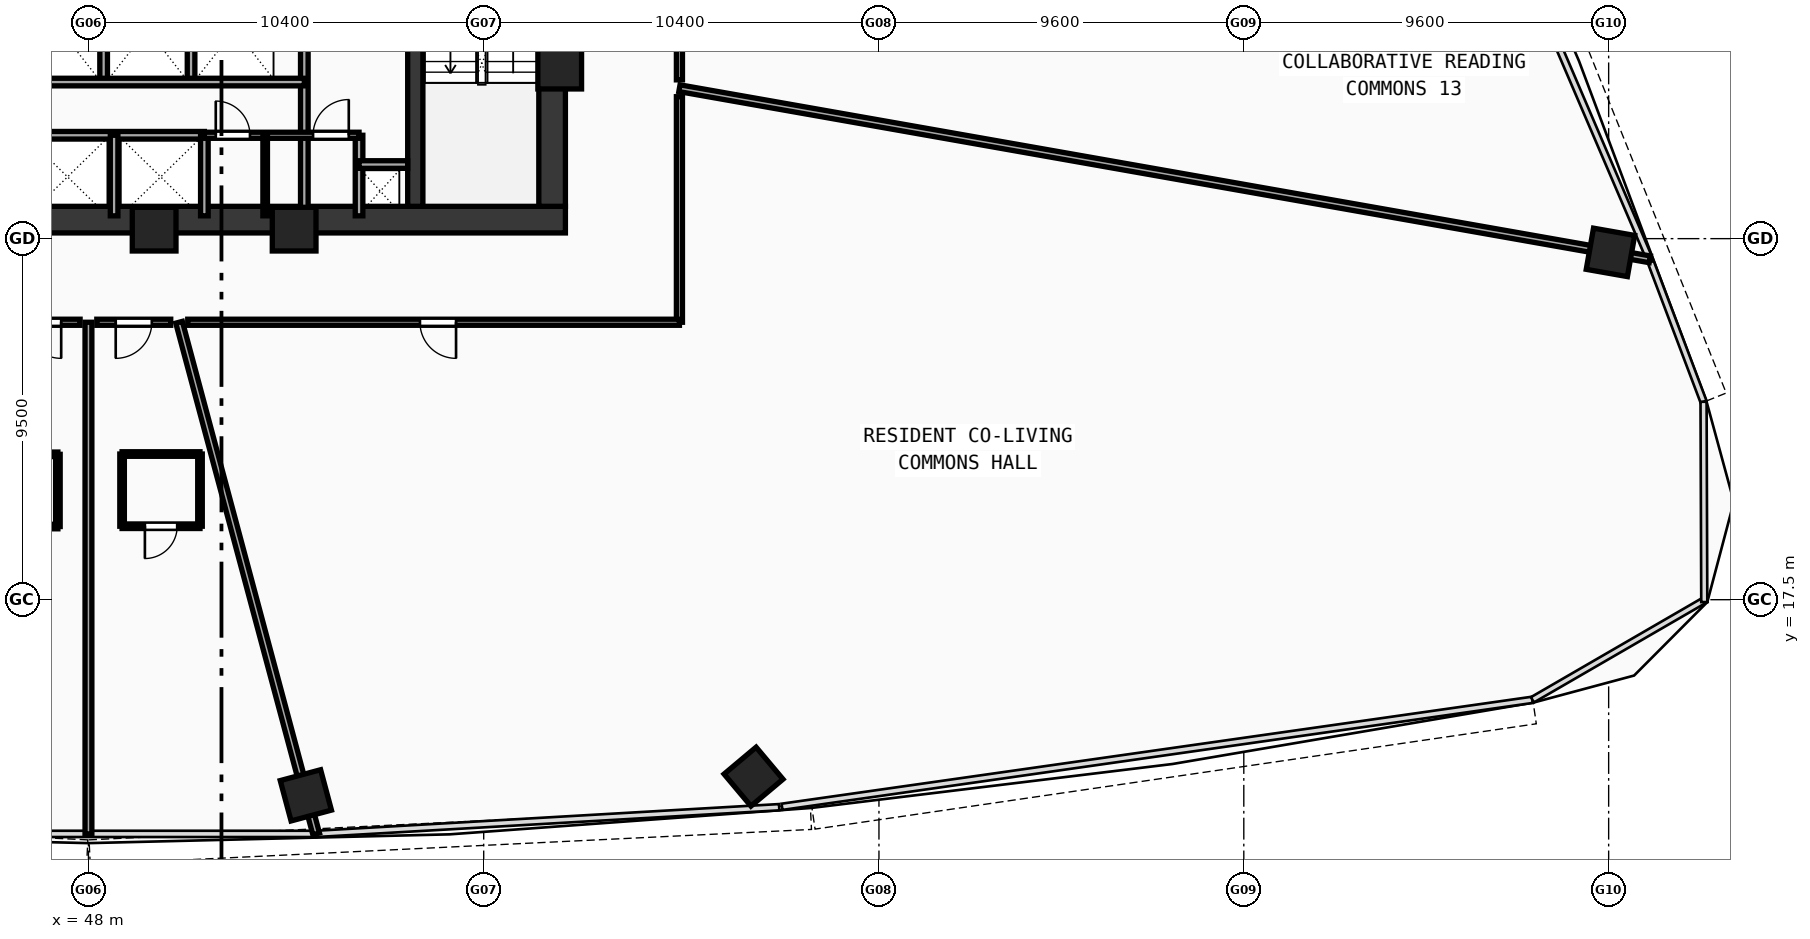
"""IFC4 building model, lengths in metres.
Left out: names, types, materials, properties, quantities, classifications, styles, units other than length and angle.
Written with IfcOpenShell. Run it as: python <this file> out.ifc"""

import sys

from ifc_helpers import new_model, si_unit, direction, frame, frame_2d, origin, origin_with_axes, origin_2d, place, context, subcontext, project, spatial, rectangle, hollow_rectangle, extrude, source, transform, mapped, element, fill, save


model = new_model("IFC4")
c1 = context("Model", 3, precision=1e-05, world=origin(), true_north=direction((0.0, 1.0)))
c2 = subcontext(c1, "Body", "Model", "MODEL_VIEW")
j1 = project(units=[si_unit("LENGTHUNIT", "METRE"), si_unit("PLANEANGLEUNIT", "RADIAN")], contexts=[c1])
p1 = place(None, origin())
s1 = spatial("IfcSite", under=j1, at=p1, CompositionType="ELEMENT")
p2 = place(p1, origin())
s2 = spatial("IfcBuilding", under=s1, at=p2, CompositionType="ELEMENT")
p3 = place(p2, frame((0.0, 0.0, 66.7)))
s3 = spatial("IfcBuildingStorey", under=s2, at=p3, CompositionType="ELEMENT", Elevation=66.7)
p4 = place(p3, frame((35.45, 27.5, 0.0), z_axis=(0.0, 0.0, 1.0), x_axis=(1.0, 0.0, 0.0)))
e1 = element("IfcWall", 1, at=p4, inside=s3, PredefinedType="SHEAR", context=c2, shape_type="SweptSolid", body=[
    extrude(rectangle(XDim=25.1, YDim=0.7, at=frame_2d((12.55, 0.0))), origin(), (0.0, 0.0, 1.0), 3.37),
])
p5 = place(p3, frame((60.2, 27.85, 0.0), z_axis=(0.0, 0.0, 1.0), x_axis=(0.0, 1.0, 0.0)))
e2 = element("IfcWall", 2, at=p5, inside=s3, PredefinedType="SHEAR", context=c2, shape_type="SweptSolid", body=[
    extrude(rectangle(XDim=12.0, YDim=0.7, at=frame_2d((6.0, 0.0))), origin(), (0.0, 0.0, 1.0), 3.37),
])
p6 = place(p3, frame((56.6, 27.85, 0.0), z_axis=(0.0, 0.0, 1.0), x_axis=(0.0, 1.0, 0.0)))
e3 = element("IfcWall", 3, at=p6, inside=s3, PredefinedType="SHEAR", context=c2, shape_type="SweptSolid", body=[
    extrude(rectangle(XDim=12.0, YDim=0.4, at=frame_2d((6.0, 0.0))), origin(), (0.0, 0.0, 1.0), 3.37),
])
p7 = place(p6, frame((9.9, 0.0, 0.0)))
e4 = element("IfcOpeningElement", 4, at=p7, cuts=e3, PredefinedType="OPENING", context=c2, shape_type="SweptSolid", body=[
    extrude(rectangle(XDim=1.1, YDim=2.1, at=frame_2d((0.55, 1.05))), frame((0.0, 0.21, 0.0), z_axis=(0.0, -1.0, 0.0), x_axis=(1.0, 0.0, 0.0)), (0.0, 0.0, 1.0), 0.42),
])
m1 = source(origin(), c2, "Body", "SweptSolid", [
    extrude(hollow_rectangle(XDim=1.15, YDim=1.15, WallThickness=0.048, at=origin_2d()), origin(), (0.0, 0.0, 1.0), 3.63),
])
for number, where, z_axis, x_axis in (
    (5, (49.729, 27.25, -0.26), (0.0, 0.0, 1.0), (1.0, 0.0, 0.0)),
    (6, (53.412, 27.25, -0.26), (0.0, 0.0, 1.0), (1.0, 0.0, 0.0)),
    (7, (60.4, 31.513, -0.26), (0.0, 0.0, 1.0), (1.0, 0.0, 0.0)),
):
    element("IfcColumn", number, at=place(p3, frame(where, z_axis=z_axis, x_axis=x_axis)), inside=s3, PredefinedType="COLUMN", context=c2, shape_type="MappedRepresentation", body=[
        mapped(m1, transform((0.0, 0.0, 0.0), scale=1.0)),
    ])
m2 = source(origin(), c2, "Body", "SweptSolid", [
    extrude(hollow_rectangle(XDim=1.1, YDim=1.1, WallThickness=0.045, at=origin_2d()), origin(), (0.0, 0.0, 1.0), 3.63),
])
for number, where, z_axis, x_axis in (
    (8, (53.72, 12.352, -0.26), (0.0, 0.0, 1.0), (0.966, 0.259, 0.0)),
    (9, (65.5, 12.844, -0.26), (0.0, 0.0, 1.0), (0.766, 0.643, 0.0)),
    (10, (88.048, 26.638, -0.26), (0.0, 0.0, 1.0), (0.174, 0.985, 0.0)),
):
    element("IfcColumn", number, at=place(p3, frame(where, z_axis=z_axis, x_axis=x_axis)), inside=s3, PredefinedType="COLUMN", context=c2, shape_type="MappedRepresentation", body=[
        mapped(m2, transform((0.0, 0.0, 0.0), scale=1.0)),
    ])
p8 = place(p3, frame((53.68, 27.6, 0.0), z_axis=(0.0, 0.0, 1.0), x_axis=(0.0, 1.0, 0.0)))
e11 = element("IfcWall", 11, at=p8, inside=s3, PredefinedType="SOLIDWALL", context=c2, shape_type="SweptSolid", body=[
    extrude(rectangle(XDim=9.05, YDim=0.2, at=frame_2d((4.525, 0.0))), origin(), (0.0, 0.0, 1.0), 3.37),
])
p9 = place(p8, frame((6.9, 0.0, 0.0)))
e12 = element("IfcOpeningElement", 12, at=p9, cuts=e11, PredefinedType="OPENING", context=c2, shape_type="SweptSolid", body=[
    extrude(rectangle(XDim=1.05, YDim=2.1, at=frame_2d((0.525, 1.05))), frame((0.0, 0.11, 0.0), z_axis=(0.0, -1.0, 0.0), x_axis=(1.0, 0.0, 0.0)), (0.0, 0.0, 1.0), 0.22),
])
for number, where, z_axis, x_axis in (
    (13, (48.4, 31.12, 0.0), (0.0, 0.0, 1.0), (0.0, 1.0, 0.0)),
    (14, (50.7, 31.12, 0.0), (0.0, 0.0, 1.0), (0.0, 1.0, 0.0)),
):
    element("IfcWall", number, at=place(p3, frame(where, z_axis=z_axis, x_axis=x_axis)), inside=s3, PredefinedType="SOLIDWALL", context=c2, shape_type="SweptSolid", body=[
        extrude(rectangle(XDim=2.7, YDim=0.2, at=frame_2d((1.35, 0.0))), origin(), (0.0, 0.0, 1.0), 3.37),
    ])
p10 = place(p3, frame((43.85, 29.72, 0.0), z_axis=(0.0, 0.0, 1.0), x_axis=(1.0, 0.0, 0.0)))
e15 = element("IfcWall", 15, at=p10, inside=s3, PredefinedType="SOLIDWALL", context=c2, shape_type="SweptSolid", body=[
    extrude(rectangle(XDim=7.2, YDim=0.2, at=frame_2d((3.6, 0.0))), origin(), (0.0, 0.0, 1.0), 3.37),
])
p11 = place(p3, frame((51.05, 27.6, 0.0), z_axis=(0.0, 0.0, 1.0), x_axis=(0.0, 1.0, 0.0)))
e16 = element("IfcWall", 16, at=p11, inside=s3, PredefinedType="SOLIDWALL", context=c2, shape_type="SweptSolid", body=[
    extrude(rectangle(XDim=2.12, YDim=0.2, at=frame_2d((1.06, 0.0))), origin(), (0.0, 0.0, 1.0), 3.37),
])
p12 = place(p3, frame((43.85, 31.12, 0.0), z_axis=(0.0, 0.0, 1.0), x_axis=(1.0, 0.0, 0.0)))
e17 = element("IfcWall", 17, at=p12, inside=s3, PredefinedType="SOLIDWALL", context=c2, shape_type="SweptSolid", body=[
    extrude(rectangle(XDim=9.83, YDim=0.2, at=frame_2d((4.915, 0.0))), origin(), (0.0, 0.0, 1.0), 3.37),
])
for number, where, z_axis, x_axis in (
    (18, (48.675, 27.6, 0.0), (0.0, 0.0, 1.0), (0.0, 1.0, 0.0)),
    (19, (55.12, 27.6, 0.0), (0.0, 0.0, 1.0), (0.0, 1.0, 0.0)),
):
    element("IfcWall", number, at=place(p3, frame(where, z_axis=z_axis, x_axis=x_axis)), inside=s3, PredefinedType="SOLIDWALL", context=c2, shape_type="SweptSolid", body=[
        extrude(rectangle(XDim=2.12, YDim=0.2, at=frame_2d((1.06, 0.0))), origin(), (0.0, 0.0, 1.0), 3.37),
    ])
p13 = place(p3, frame((55.12, 28.95, 0.0), z_axis=(0.0, 0.0, 1.0), x_axis=(1.0, 0.0, 0.0)))
e20 = element("IfcWall", 20, at=p13, inside=s3, PredefinedType="SOLIDWALL", context=c2, shape_type="SweptSolid", body=[
    extrude(rectangle(XDim=1.28, YDim=0.2, at=frame_2d((0.64, 0.0))), origin(), (0.0, 0.0, 1.0), 3.37),
])
p14 = place(p3, frame((51.05, 29.72, 0.0), z_axis=(0.0, 0.0, 1.0), x_axis=(1.0, 0.0, 0.0)))
e21 = element("IfcWall", 21, at=p14, inside=s3, PredefinedType="PARTITIONING", context=c2, shape_type="SweptSolid", body=[
    extrude(rectangle(XDim=4.07, YDim=0.16, at=frame_2d((2.035, 0.0))), origin(), (0.0, 0.0, 1.0), 3.37),
])
p15 = place(p14, frame((0.3, 0.0, 0.0)))
e22 = element("IfcOpeningElement", 22, at=p15, cuts=e21, PredefinedType="OPENING", context=c2, shape_type="SweptSolid", body=[
    extrude(rectangle(XDim=0.9, YDim=2.1, at=frame_2d((0.45, 1.05))), frame((0.0, 0.09, 0.0), z_axis=(0.0, -1.0, 0.0), x_axis=(1.0, 0.0, 0.0)), (0.0, 0.0, 1.0), 0.18),
])
p16 = place(p14, frame((2.86, 0.0, 0.0)))
e23 = element("IfcOpeningElement", 23, at=p16, cuts=e21, PredefinedType="OPENING", context=c2, shape_type="SweptSolid", body=[
    extrude(rectangle(XDim=0.94, YDim=2.1, at=frame_2d((0.47, 1.05))), frame((0.0, 0.09, 0.0), z_axis=(0.0, -1.0, 0.0), x_axis=(1.0, 0.0, 0.0)), (0.0, 0.0, 1.0), 0.18),
])
p17 = place(p3, frame((52.65, 27.6, 0.0), z_axis=(0.0, 0.0, 1.0), x_axis=(0.0, 1.0, 0.0)))
e24 = element("IfcWall", 24, at=p17, inside=s3, PredefinedType="PARTITIONING", context=c2, shape_type="SweptSolid", body=[
    extrude(rectangle(XDim=2.12, YDim=0.12, at=frame_2d((1.06, 0.0))), origin(), (0.0, 0.0, 1.0), 3.37),
])
p18 = place(p3, frame((48.0, 24.8, 0.0), z_axis=(0.0, 0.0, 1.0), x_axis=(0.0, -1.0, 0.0)))
e25 = element("IfcWall", 25, at=p18, inside=s3, PredefinedType="PARTITIONING", context=c2, shape_type="SweptSolid", body=[
    extrude(rectangle(XDim=13.462, YDim=0.18, at=frame_2d((6.731, 0.0))), origin(), (0.0, 0.0, 1.0), 2.67),
])
p19 = place(p3, frame((50.385, 24.8, 0.0), z_axis=(0.0, 0.0, 1.0), x_axis=(0.258819267056, -0.965925766817, 0.0)))
e26 = element("IfcWall", 26, at=p19, inside=s3, PredefinedType="PARTITIONING", context=c2, shape_type="SweptSolid", body=[
    extrude(rectangle(XDim=13.937, YDim=0.18, at=frame_2d((6.969, 0.0))), origin(), (0.0, 0.0, 1.0), 2.67),
])
p20 = place(p3, frame((63.55, 30.958, 0.0), z_axis=(0.0, 0.0, 1.0), x_axis=(0.984809239356, -0.173639747982, 0.0)))
e27 = element("IfcWall", 27, at=p20, inside=s3, PredefinedType="PARTITIONING", context=c2, shape_type="SweptSolid", body=[
    extrude(rectangle(XDim=25.926, YDim=0.18, at=frame_2d((12.963, 0.0))), origin(), (0.0, 0.0, 1.0), 2.67),
])
p21 = place(p3, frame((63.55, 34.023, 0.0), z_axis=(0.0, 0.0, 1.0), x_axis=(0.0, -1.0, 0.0)))
e28 = element("IfcWall", 28, at=p21, inside=s3, PredefinedType="PARTITIONING", context=c2, shape_type="SweptSolid", body=[
    extrude(rectangle(XDim=2.845, YDim=0.16, at=frame_2d((1.423, 0.0))), origin(), (0.0, 0.0, 1.0), 3.37),
])
p22 = place(p21, frame((0.948, 0.0, 0.0)))
e29 = element("IfcOpeningElement", 29, at=p22, cuts=e28, PredefinedType="OPENING", context=c2, shape_type="SweptSolid", body=[
    extrude(rectangle(XDim=0.95, YDim=2.1, at=frame_2d((0.475, 1.05))), frame((0.0, 0.09, 0.0), z_axis=(0.0, -1.0, 0.0), x_axis=(1.0, 0.0, 0.0)), (0.0, 0.0, 1.0), 0.18),
])
p23 = place(p3, frame((63.55, 30.735, 0.0), z_axis=(0.0, 0.0, 1.0), x_axis=(0.0, -1.0, 0.0)))
e30 = element("IfcWall", 30, at=p23, inside=s3, PredefinedType="PARTITIONING", context=c2, shape_type="SweptSolid", body=[
    extrude(rectangle(XDim=5.935, YDim=0.16, at=frame_2d((2.967, 0.0))), origin(), (0.0, 0.0, 1.0), 2.97),
])
p24 = place(p3, frame((63.55, 24.8, 0.0), z_axis=(0.0, 0.0, 1.0), x_axis=(-1.0, 0.0, 0.0)))
e31 = element("IfcWall", 31, at=p24, inside=s3, PredefinedType="PARTITIONING", context=c2, shape_type="SweptSolid", body=[
    extrude(rectangle(XDim=12.938, YDim=0.16, at=frame_2d((6.469, 0.0))), origin(), (0.0, 0.0, 1.0), 2.67),
])
p25 = place(p24, frame((5.878, 0.0, 0.0)))
e32 = element("IfcOpeningElement", 32, at=p25, cuts=e31, PredefinedType="OPENING", context=c2, shape_type="SweptSolid", body=[
    extrude(rectangle(XDim=0.95, YDim=2.1, at=frame_2d((0.475, 1.05))), frame((0.0, 0.09, 0.0), z_axis=(0.0, -1.0, 0.0), x_axis=(1.0, 0.0, 0.0)), (0.0, 0.0, 1.0), 0.18),
])
p26 = place(p3, frame((50.165, 24.8, 0.0), z_axis=(0.0, 0.0, 1.0), x_axis=(-1.0, 0.0, 0.0)))
e33 = element("IfcWall", 33, at=p26, inside=s3, PredefinedType="PARTITIONING", context=c2, shape_type="SweptSolid", body=[
    extrude(rectangle(XDim=1.945, YDim=0.16, at=frame_2d((0.972, 0.0))), origin(), (0.0, 0.0, 1.0), 3.37),
])
p27 = place(p26, frame((0.498, 0.0, 0.0)))
e34 = element("IfcOpeningElement", 34, at=p27, cuts=e33, PredefinedType="OPENING", context=c2, shape_type="SweptSolid", body=[
    extrude(rectangle(XDim=0.95, YDim=2.1, at=frame_2d((0.475, 1.05))), frame((0.0, 0.09, 0.0), z_axis=(0.0, -1.0, 0.0), x_axis=(1.0, 0.0, 0.0)), (0.0, 0.0, 1.0), 0.18),
])
p28 = place(p3, frame((47.78, 24.8, 0.0), z_axis=(0.0, 0.0, 1.0), x_axis=(-1.0, 0.0, 0.0)))
e35 = element("IfcWall", 35, at=p28, inside=s3, PredefinedType="PARTITIONING", context=c2, shape_type="SweptSolid", body=[
    extrude(rectangle(XDim=1.945, YDim=0.16, at=frame_2d((0.972, 0.0))), origin(), (0.0, 0.0, 1.0), 3.37),
])
p29 = place(p28, frame((0.497, 0.0, 0.0)))
e36 = element("IfcOpeningElement", 36, at=p29, cuts=e35, PredefinedType="OPENING", context=c2, shape_type="SweptSolid", body=[
    extrude(rectangle(XDim=0.95, YDim=2.1, at=frame_2d((0.475, 1.05))), frame((0.0, 0.09, 0.0), z_axis=(0.0, -1.0, 0.0), x_axis=(1.0, 0.0, 0.0)), (0.0, 0.0, 1.0), 0.18),
])
p30 = place(p3, frame((45.146, 19.425, 0.0), z_axis=(0.0, 0.0, 1.0), x_axis=(1.0, 0.0, 0.0)))
e37 = element("IfcWall", 37, at=p30, inside=s3, PredefinedType="PARTITIONING", context=c2, shape_type="SweptSolid", body=[
    extrude(rectangle(XDim=2.05, YDim=0.12, at=frame_2d((1.025, 0.0))), origin(), (0.0, 0.0, 1.0), 3.37),
])
p31 = place(p30, frame((0.6, 0.0, 0.0)))
e38 = element("IfcOpeningElement", 38, at=p31, cuts=e37, PredefinedType="OPENING", context=c2, shape_type="SweptSolid", body=[
    extrude(rectangle(XDim=0.85, YDim=2.1, at=frame_2d((0.425, 1.05))), frame((0.0, 0.07, 0.0), z_axis=(0.0, -1.0, 0.0), x_axis=(1.0, 0.0, 0.0)), (0.0, 0.0, 1.0), 0.14),
])
p32 = place(p3, frame((47.196, 19.425, 0.0), z_axis=(0.0, 0.0, 1.0), x_axis=(0.0, 1.0, 0.0)))
e39 = element("IfcWall", 39, at=p32, inside=s3, PredefinedType="PARTITIONING", context=c2, shape_type="SweptSolid", body=[
    extrude(rectangle(XDim=1.9, YDim=0.12, at=frame_2d((0.95, 0.0))), origin(), (0.0, 0.0, 1.0), 3.37),
])
p33 = place(p3, frame((47.196, 21.325, 0.0), z_axis=(0.0, 0.0, 1.0), x_axis=(-1.0, 0.0, 0.0)))
e40 = element("IfcWall", 40, at=p33, inside=s3, PredefinedType="PARTITIONING", context=c2, shape_type="SweptSolid", body=[
    extrude(rectangle(XDim=2.05, YDim=0.12, at=frame_2d((1.025, 0.0))), origin(), (0.0, 0.0, 1.0), 3.37),
])
p34 = place(p3, frame((48.885, 19.433, 0.0), z_axis=(0.0, 0.0, 1.0), x_axis=(1.0, 0.0, 0.0)))
e41 = element("IfcWall", 41, at=p34, inside=s3, PredefinedType="PARTITIONING", context=c2, shape_type="SweptSolid", body=[
    extrude(rectangle(XDim=2.05, YDim=0.12, at=frame_2d((1.025, 0.0))), origin(), (0.0, 0.0, 1.0), 3.37),
])
p35 = place(p34, frame((0.6, 0.0, 0.0)))
e42 = element("IfcOpeningElement", 42, at=p35, cuts=e41, PredefinedType="OPENING", context=c2, shape_type="SweptSolid", body=[
    extrude(rectangle(XDim=0.85, YDim=2.1, at=frame_2d((0.425, 1.05))), frame((0.0, 0.07, 0.0), z_axis=(0.0, -1.0, 0.0), x_axis=(1.0, 0.0, 0.0)), (0.0, 0.0, 1.0), 0.14),
])
p36 = place(p3, frame((50.935, 19.433, 0.0), z_axis=(0.0, 0.0, 1.0), x_axis=(0.0, 1.0, 0.0)))
e43 = element("IfcWall", 43, at=p36, inside=s3, PredefinedType="PARTITIONING", context=c2, shape_type="SweptSolid", body=[
    extrude(rectangle(XDim=1.9, YDim=0.12, at=frame_2d((0.95, 0.0))), origin(), (0.0, 0.0, 1.0), 3.37),
])
p37 = place(p3, frame((50.935, 21.333, 0.0), z_axis=(0.0, 0.0, 1.0), x_axis=(-1.0, 0.0, 0.0)))
e44 = element("IfcWall", 44, at=p37, inside=s3, PredefinedType="PARTITIONING", context=c2, shape_type="SweptSolid", body=[
    extrude(rectangle(XDim=2.05, YDim=0.12, at=frame_2d((1.025, 0.0))), origin(), (0.0, 0.0, 1.0), 3.37),
])
p38 = place(p3, frame((48.885, 21.333, 0.0), z_axis=(0.0, 0.0, 1.0), x_axis=(0.0, -1.0, 0.0)))
e45 = element("IfcWall", 45, at=p38, inside=s3, PredefinedType="PARTITIONING", context=c2, shape_type="SweptSolid", body=[
    extrude(rectangle(XDim=1.9, YDim=0.12, at=frame_2d((0.95, 0.0))), origin(), (0.0, 0.0, 1.0), 3.37),
])
m3 = source(origin(), c2, "Body", "SweptSolid", [
    extrude(rectangle(XDim=0.9, YDim=2.1, at=frame_2d((0.45, 1.05))), frame((0.0, 0.025, 0.0), z_axis=(0.0, -1.0, 0.0), x_axis=(1.0, 0.0, 0.0)), (0.0, 0.0, 1.0), 0.05),
])
p39 = place(p15, origin_with_axes())
e46 = element("IfcDoor", 46, at=p39, inside=s3, OperationType="SINGLE_SWING_LEFT", PredefinedType="DOOR", context=c2, shape_type="MappedRepresentation", body=[
    mapped(m3, transform((0.0, 0.0, 0.0), scale=1.0)),
])
fill(e22, e46)
m4 = source(origin(), c2, "Body", "SweptSolid", [
    extrude(rectangle(XDim=0.94, YDim=2.1, at=frame_2d((0.47, 1.05))), frame((0.0, 0.025, 0.0), z_axis=(0.0, -1.0, 0.0), x_axis=(1.0, 0.0, 0.0)), (0.0, 0.0, 1.0), 0.05),
])
p40 = place(p16, origin_with_axes())
e47 = element("IfcDoor", 47, at=p40, inside=s3, OperationType="SINGLE_SWING_RIGHT", PredefinedType="DOOR", context=c2, shape_type="MappedRepresentation", body=[
    mapped(m4, transform((0.0, 0.0, 0.0), scale=1.0)),
])
fill(e23, e47)
m5 = source(origin(), c2, "Body", "SweptSolid", [
    extrude(rectangle(XDim=0.95, YDim=2.1, at=frame_2d((0.475, 1.05))), frame((0.0, 0.025, 0.0), z_axis=(0.0, -1.0, 0.0), x_axis=(1.0, 0.0, 0.0)), (0.0, 0.0, 1.0), 0.05),
])
p41 = place(p29, origin_with_axes())
e48 = element("IfcDoor", 48, at=p41, inside=s3, OperationType="SINGLE_SWING_LEFT", PredefinedType="DOOR", context=c2, shape_type="MappedRepresentation", body=[
    mapped(m5, transform((0.0, 0.0, 0.0), scale=1.0)),
])
fill(e36, e48)
p42 = place(p27, origin_with_axes())
e49 = element("IfcDoor", 49, at=p42, inside=s3, OperationType="SINGLE_SWING_RIGHT", PredefinedType="DOOR", context=c2, shape_type="MappedRepresentation", body=[
    mapped(m5, transform((0.0, 0.0, 0.0), scale=1.0)),
])
fill(e34, e49)
m6 = source(origin(), c2, "Body", "SweptSolid", [
    extrude(rectangle(XDim=0.85, YDim=2.1, at=frame_2d((0.425, 1.05))), frame((0.0, 0.025, 0.0), z_axis=(0.0, -1.0, 0.0), x_axis=(1.0, 0.0, 0.0)), (0.0, 0.0, 1.0), 0.05),
])
p43 = place(p35, frame((0.85, 0.0, 0.0), z_axis=(0.0, 0.0, 1.0), x_axis=(-1.0, 0.0, 0.0)))
e50 = element("IfcDoor", 50, at=p43, inside=s3, OperationType="SINGLE_SWING_RIGHT", PredefinedType="DOOR", context=c2, shape_type="MappedRepresentation", body=[
    mapped(m6, transform((0.0, 0.0, 0.0), scale=1.0)),
])
fill(e42, e50)
p44 = place(p25, origin_with_axes())
e51 = element("IfcDoor", 51, at=p44, inside=s3, OperationType="SINGLE_SWING_LEFT", PredefinedType="DOOR", context=c2, shape_type="MappedRepresentation", body=[
    mapped(m5, transform((0.0, 0.0, 0.0), scale=1.0)),
])
fill(e32, e51)
save(model, sys.argv[1])
